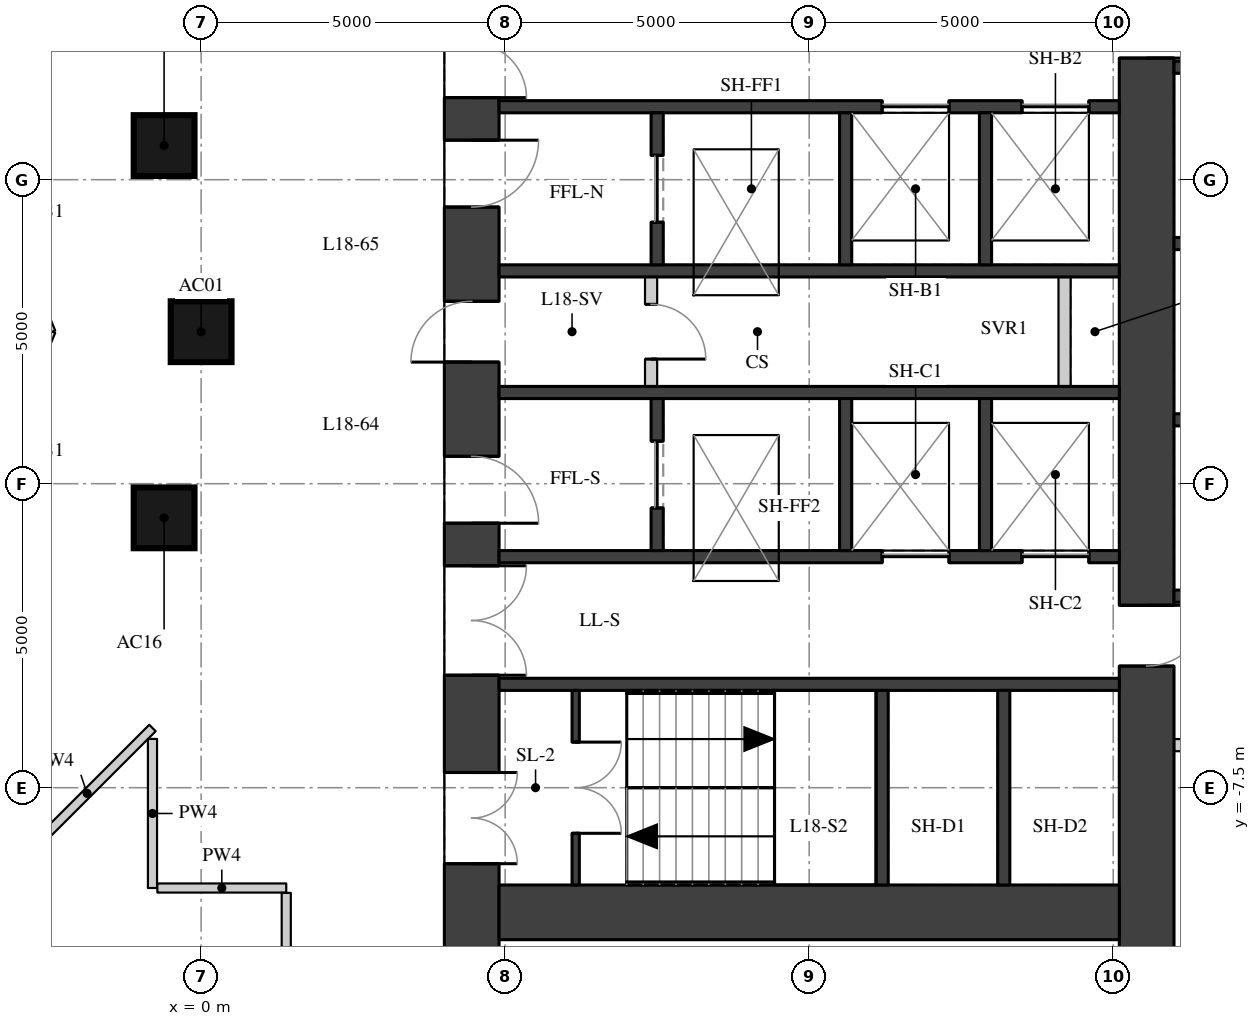
"""IFC4 building model, lengths in metres.
Left out: names, types, materials, properties, quantities, classifications, styles, units other than length and angle.
Written with IfcOpenShell. Run it as: python <this file> out.ifc"""

import sys

from ifc_helpers import new_model, si_unit, direction, frame, frame_2d, origin, origin_2d, place, context, subcontext, project, spatial, rectangle, extrude, element, fill, save


model = new_model("IFC4")
c1 = context("Model", 3, precision=1e-05, world=origin(), true_north=direction((0.0, 1.0)))
c2 = subcontext(c1, "Body", "Model", "MODEL_VIEW")
j1 = project(units=[si_unit("LENGTHUNIT", "METRE"), si_unit("PLANEANGLEUNIT", "RADIAN")], contexts=[c1])
p1 = place(None, origin())
s1 = spatial("IfcSite", under=j1, at=p1, CompositionType="ELEMENT")
p2 = place(p1, origin())
s2 = spatial("IfcBuilding", under=s1, at=p2, CompositionType="ELEMENT")
p3 = place(p2, frame((0.0, 0.0, 67.9)))
s3 = spatial("IfcBuildingStorey", under=s2, at=p3, CompositionType="ELEMENT", Elevation=67.9)
for number, where, z_axis, x_axis in (
    (1, (0.0, 0.0, 0.0), (0.0, 0.0, 1.0), (1.0, 0.0, 0.0)),
    (2, (-0.609, 3.062, 0.0), (0.0, 0.0, 1.0), (1.0, 0.0, 0.0)),
    (3, (-0.609, -3.062, 0.0), (0.0, 0.0, 1.0), (1.0, 0.0, 0.0)),
):
    element("IfcColumn", number, at=place(p3, frame(where, z_axis=z_axis, x_axis=x_axis)), inside=s3, PredefinedType="COLUMN", context=c2, shape_type="SweptSolid", body=[
        extrude(rectangle(XDim=1.0, YDim=1.0, at=origin_2d()), origin(), (0.0, 0.0, 1.0), 3.3),
    ])
p4 = place(p3, frame((4.45, -11.1, 0.0), z_axis=(0.0, 0.0, 1.0), x_axis=(0.0, 1.0, 0.0)))
e4 = element("IfcWall", 4, at=p4, inside=s3, PredefinedType="SHEAR", context=c2, shape_type="SweptSolid", body=[
    extrude(rectangle(XDim=22.2, YDim=0.9, at=frame_2d((11.1, 0.0))), origin(), (0.0, 0.0, 1.0), 3.02),
])
p5 = place(p4, frame((2.35, 0.0, 0.0)))
e5 = element("IfcOpeningElement", 5, at=p5, cuts=e4, PredefinedType="OPENING", context=c2, shape_type="SweptSolid", body=[
    extrude(rectangle(XDim=1.5, YDim=2.1, at=frame_2d((0.75, 1.05))), frame((0.0, 0.46, 0.0), z_axis=(0.0, -1.0, 0.0), x_axis=(1.0, 0.0, 0.0)), (0.0, 0.0, 1.0), 0.92),
])
p6 = place(p4, frame((5.45, 0.0, 0.0)))
e6 = element("IfcOpeningElement", 6, at=p6, cuts=e4, PredefinedType="OPENING", context=c2, shape_type="SweptSolid", body=[
    extrude(rectangle(XDim=1.8, YDim=2.1, at=frame_2d((0.9, 1.05))), frame((0.0, 0.46, 0.0), z_axis=(0.0, -1.0, 0.0), x_axis=(1.0, 0.0, 0.0)), (0.0, 0.0, 1.0), 0.92),
])
p7 = place(p4, frame((7.95, 0.0, 0.0)))
e7 = element("IfcOpeningElement", 7, at=p7, cuts=e4, PredefinedType="OPENING", context=c2, shape_type="SweptSolid", body=[
    extrude(rectangle(XDim=1.1, YDim=2.1, at=frame_2d((0.55, 1.05))), frame((0.0, 0.46, 0.0), z_axis=(0.0, -1.0, 0.0), x_axis=(1.0, 0.0, 0.0)), (0.0, 0.0, 1.0), 0.92),
])
p8 = place(p4, frame((10.6, 0.0, 0.0)))
e8 = element("IfcOpeningElement", 8, at=p8, cuts=e4, PredefinedType="OPENING", context=c2, shape_type="SweptSolid", body=[
    extrude(rectangle(XDim=1.0, YDim=2.1, at=frame_2d((0.5, 1.05))), frame((0.0, 0.46, 0.0), z_axis=(0.0, -1.0, 0.0), x_axis=(1.0, 0.0, 0.0)), (0.0, 0.0, 1.0), 0.92),
])
p9 = place(p4, frame((13.15, 0.0, 0.0)))
e9 = element("IfcOpeningElement", 9, at=p9, cuts=e4, PredefinedType="OPENING", context=c2, shape_type="SweptSolid", body=[
    extrude(rectangle(XDim=1.1, YDim=2.1, at=frame_2d((0.55, 1.05))), frame((0.0, 0.46, 0.0), z_axis=(0.0, -1.0, 0.0), x_axis=(1.0, 0.0, 0.0)), (0.0, 0.0, 1.0), 0.92),
])
p10 = place(p4, frame((14.95, 0.0, 0.0)))
e10 = element("IfcOpeningElement", 10, at=p10, cuts=e4, PredefinedType="OPENING", context=c2, shape_type="SweptSolid", body=[
    extrude(rectangle(XDim=1.8, YDim=2.1, at=frame_2d((0.9, 1.05))), frame((0.0, 0.46, 0.0), z_axis=(0.0, -1.0, 0.0), x_axis=(1.0, 0.0, 0.0)), (0.0, 0.0, 1.0), 0.92),
])
p11 = place(p4, frame((18.35, 0.0, 0.0)))
e11 = element("IfcOpeningElement", 11, at=p11, cuts=e4, PredefinedType="OPENING", context=c2, shape_type="SweptSolid", body=[
    extrude(rectangle(XDim=1.5, YDim=2.1, at=frame_2d((0.75, 1.05))), frame((0.0, 0.46, 0.0), z_axis=(0.0, -1.0, 0.0), x_axis=(1.0, 0.0, 0.0)), (0.0, 0.0, 1.0), 0.92),
])
p12 = place(p3, frame((15.55, -11.1, 0.0), z_axis=(0.0, 0.0, 1.0), x_axis=(0.0, 1.0, 0.0)))
e12 = element("IfcWall", 12, at=p12, inside=s3, PredefinedType="SHEAR", context=c2, shape_type="SweptSolid", body=[
    extrude(rectangle(XDim=22.2, YDim=0.9, at=frame_2d((11.1, 0.0))), origin(), (0.0, 0.0, 1.0), 3.02),
])
p13 = place(p12, frame((15.6, 0.0, 0.0)))
e13 = element("IfcOpeningElement", 13, at=p13, cuts=e12, PredefinedType="OPENING", context=c2, shape_type="SweptSolid", body=[
    extrude(rectangle(XDim=1.0, YDim=2.1, at=frame_2d((0.5, 1.05))), frame((0.0, 0.46, 0.0), z_axis=(0.0, -1.0, 0.0), x_axis=(1.0, 0.0, 0.0)), (0.0, 0.0, 1.0), 0.92),
])
p14 = place(p12, frame((5.6, 0.0, 0.0)))
e14 = element("IfcOpeningElement", 14, at=p14, cuts=e12, PredefinedType="OPENING", context=c2, shape_type="SweptSolid", body=[
    extrude(rectangle(XDim=1.0, YDim=2.1, at=frame_2d((0.5, 1.05))), frame((0.0, 0.46, 0.0), z_axis=(0.0, -1.0, 0.0), x_axis=(1.0, 0.0, 0.0)), (0.0, 0.0, 1.0), 0.92),
])
p15 = place(p3, frame((4.9, -9.55, 0.0), z_axis=(0.0, 0.0, 1.0), x_axis=(1.0, 0.0, 0.0)))
e15 = element("IfcWall", 15, at=p15, inside=s3, PredefinedType="SHEAR", context=c2, shape_type="SweptSolid", body=[
    extrude(rectangle(XDim=10.2, YDim=0.9, at=frame_2d((5.1, 0.0))), origin(), (0.0, 0.0, 1.0), 3.02),
])
p16 = place(p3, frame((4.9, 3.7, 0.0), z_axis=(0.0, 0.0, 1.0), x_axis=(1.0, 0.0, 0.0)))
e16 = element("IfcWall", 16, at=p16, inside=s3, PredefinedType="SHEAR", context=c2, shape_type="SweptSolid", body=[
    extrude(rectangle(XDim=10.2, YDim=0.2, at=frame_2d((5.1, 0.0))), origin(), (0.0, 0.0, 1.0), 3.02),
])
p17 = place(p16, frame((6.3, 0.0, 0.0)))
e17 = element("IfcOpeningElement", 17, at=p17, cuts=e16, PredefinedType="OPENING", context=c2, shape_type="SweptSolid", body=[
    extrude(rectangle(XDim=1.1, YDim=2.1, at=frame_2d((0.55, 1.05))), frame((0.0, 0.11, 0.0), z_axis=(0.0, -1.0, 0.0), x_axis=(1.0, 0.0, 0.0)), (0.0, 0.0, 1.0), 0.22),
])
p18 = place(p16, frame((8.6, 0.0, 0.0)))
e18 = element("IfcOpeningElement", 18, at=p18, cuts=e16, PredefinedType="OPENING", context=c2, shape_type="SweptSolid", body=[
    extrude(rectangle(XDim=1.1, YDim=2.1, at=frame_2d((0.55, 1.05))), frame((0.0, 0.11, 0.0), z_axis=(0.0, -1.0, 0.0), x_axis=(1.0, 0.0, 0.0)), (0.0, 0.0, 1.0), 0.22),
])
for number, where, z_axis, x_axis in (
    (19, (4.9, 1.0, 0.0), (0.0, 0.0, 1.0), (1.0, 0.0, 0.0)),
    (20, (4.9, -1.0, 0.0), (0.0, 0.0, 1.0), (1.0, 0.0, 0.0)),
):
    element("IfcWall", number, at=place(p3, frame(where, z_axis=z_axis, x_axis=x_axis)), inside=s3, PredefinedType="SHEAR", context=c2, shape_type="SweptSolid", body=[
        extrude(rectangle(XDim=10.2, YDim=0.2, at=frame_2d((5.1, 0.0))), origin(), (0.0, 0.0, 1.0), 3.02),
    ])
p19 = place(p3, frame((4.9, -3.7, 0.0), z_axis=(0.0, 0.0, 1.0), x_axis=(1.0, 0.0, 0.0)))
e21 = element("IfcWall", 21, at=p19, inside=s3, PredefinedType="SHEAR", context=c2, shape_type="SweptSolid", body=[
    extrude(rectangle(XDim=10.2, YDim=0.2, at=frame_2d((5.1, 0.0))), origin(), (0.0, 0.0, 1.0), 3.02),
])
p20 = place(p19, frame((6.3, 0.0, 0.0)))
e22 = element("IfcOpeningElement", 22, at=p20, cuts=e21, PredefinedType="OPENING", context=c2, shape_type="SweptSolid", body=[
    extrude(rectangle(XDim=1.1, YDim=2.1, at=frame_2d((0.55, 1.05))), frame((0.0, 0.11, 0.0), z_axis=(0.0, -1.0, 0.0), x_axis=(1.0, 0.0, 0.0)), (0.0, 0.0, 1.0), 0.22),
])
p21 = place(p19, frame((8.6, 0.0, 0.0)))
e23 = element("IfcOpeningElement", 23, at=p21, cuts=e21, PredefinedType="OPENING", context=c2, shape_type="SweptSolid", body=[
    extrude(rectangle(XDim=1.1, YDim=2.1, at=frame_2d((0.55, 1.05))), frame((0.0, 0.11, 0.0), z_axis=(0.0, -1.0, 0.0), x_axis=(1.0, 0.0, 0.0)), (0.0, 0.0, 1.0), 0.22),
])
p22 = place(p3, frame((4.9, -5.8, 0.0), z_axis=(0.0, 0.0, 1.0), x_axis=(1.0, 0.0, 0.0)))
e24 = element("IfcWall", 24, at=p22, inside=s3, PredefinedType="SHEAR", context=c2, shape_type="SweptSolid", body=[
    extrude(rectangle(XDim=10.2, YDim=0.2, at=frame_2d((5.1, 0.0))), origin(), (0.0, 0.0, 1.0), 3.02),
])
for number, where, z_axis, x_axis in (
    (25, (11.2, -9.1, 0.0), (0.0, 0.0, 1.0), (0.0, 1.0, 0.0)),
    (26, (13.2, -9.1, 0.0), (0.0, 0.0, 1.0), (0.0, 1.0, 0.0)),
):
    element("IfcWall", number, at=place(p3, frame(where, z_axis=z_axis, x_axis=x_axis)), inside=s3, PredefinedType="SHEAR", context=c2, shape_type="SweptSolid", body=[
        extrude(rectangle(XDim=3.2, YDim=0.2, at=frame_2d((1.6, 0.0))), origin(), (0.0, 0.0, 1.0), 3.02),
    ])
p23 = place(p3, frame((7.5, 1.1, 0.0), z_axis=(0.0, 0.0, 1.0), x_axis=(0.0, 1.0, 0.0)))
e27 = element("IfcWall", 27, at=p23, inside=s3, PredefinedType="SHEAR", context=c2, shape_type="SweptSolid", body=[
    extrude(rectangle(XDim=2.5, YDim=0.2, at=frame_2d((1.25, 0.0))), origin(), (0.0, 0.0, 1.0), 3.02),
])
p24 = place(p23, frame((0.7, 0.0, 0.0)))
e28 = element("IfcOpeningElement", 28, at=p24, cuts=e27, PredefinedType="OPENING", context=c2, shape_type="SweptSolid", body=[
    extrude(rectangle(XDim=1.1, YDim=2.1, at=frame_2d((0.55, 1.05))), frame((0.0, 0.11, 0.0), z_axis=(0.0, -1.0, 0.0), x_axis=(1.0, 0.0, 0.0)), (0.0, 0.0, 1.0), 0.22),
])
p25 = place(p3, frame((7.5, -3.6, 0.0), z_axis=(0.0, 0.0, 1.0), x_axis=(0.0, 1.0, 0.0)))
e29 = element("IfcWall", 29, at=p25, inside=s3, PredefinedType="SHEAR", context=c2, shape_type="SweptSolid", body=[
    extrude(rectangle(XDim=2.5, YDim=0.2, at=frame_2d((1.25, 0.0))), origin(), (0.0, 0.0, 1.0), 3.02),
])
p26 = place(p25, frame((0.7, 0.0, 0.0)))
e30 = element("IfcOpeningElement", 30, at=p26, cuts=e29, PredefinedType="OPENING", context=c2, shape_type="SweptSolid", body=[
    extrude(rectangle(XDim=1.1, YDim=2.1, at=frame_2d((0.55, 1.05))), frame((0.0, 0.11, 0.0), z_axis=(0.0, -1.0, 0.0), x_axis=(1.0, 0.0, 0.0)), (0.0, 0.0, 1.0), 0.22),
])
for number, where, z_axis, x_axis in (
    (31, (10.6, 1.1, 0.0), (0.0, 0.0, 1.0), (0.0, 1.0, 0.0)),
    (32, (10.6, -3.6, 0.0), (0.0, 0.0, 1.0), (0.0, 1.0, 0.0)),
    (33, (12.9, 1.1, 0.0), (0.0, 0.0, 1.0), (0.0, 1.0, 0.0)),
    (34, (12.9, -3.6, 0.0), (0.0, 0.0, 1.0), (0.0, 1.0, 0.0)),
):
    element("IfcWall", number, at=place(p3, frame(where, z_axis=z_axis, x_axis=x_axis)), inside=s3, PredefinedType="SHEAR", context=c2, shape_type="SweptSolid", body=[
        extrude(rectangle(XDim=2.5, YDim=0.2, at=frame_2d((1.25, 0.0))), origin(), (0.0, 0.0, 1.0), 3.02),
    ])
p27 = place(p3, frame((6.16, -9.1, 0.0), z_axis=(0.0, 0.0, 1.0), x_axis=(0.0, 1.0, 0.0)))
e35 = element("IfcWall", 35, at=p27, inside=s3, PredefinedType="SHEAR", context=c2, shape_type="SweptSolid", body=[
    extrude(rectangle(XDim=3.2, YDim=0.12, at=frame_2d((1.6, 0.0))), origin(), (0.0, 0.0, 1.0), 3.02),
])
p28 = place(p27, frame((0.85, 0.0, 0.0)))
e36 = element("IfcOpeningElement", 36, at=p28, cuts=e35, PredefinedType="OPENING", context=c2, shape_type="SweptSolid", body=[
    extrude(rectangle(XDim=1.5, YDim=2.1, at=frame_2d((0.75, 1.05))), frame((0.0, 0.07, 0.0), z_axis=(0.0, -1.0, 0.0), x_axis=(1.0, 0.0, 0.0)), (0.0, 0.0, 1.0), 0.14),
])
p29 = place(p3, frame((7.4, -0.9, 0.0), z_axis=(0.0, 0.0, 1.0), x_axis=(0.0, 1.0, 0.0)))
e37 = element("IfcWall", 37, at=p29, inside=s3, PredefinedType="PARTITIONING", context=c2, shape_type="SweptSolid", body=[
    extrude(rectangle(XDim=1.8, YDim=0.2, at=frame_2d((0.9, 0.0))), origin(), (0.0, 0.0, 1.0), 3.02),
])
p30 = place(p29, frame((0.45, 0.0, 0.0)))
e38 = element("IfcOpeningElement", 38, at=p30, cuts=e37, PredefinedType="OPENING", context=c2, shape_type="SweptSolid", body=[
    extrude(rectangle(XDim=0.9, YDim=2.1, at=frame_2d((0.45, 1.05))), frame((0.0, 0.11, 0.0), z_axis=(0.0, -1.0, 0.0), x_axis=(1.0, 0.0, 0.0)), (0.0, 0.0, 1.0), 0.22),
])
p31 = place(p3, frame((14.2, -0.9, 0.0), z_axis=(0.0, 0.0, 1.0), x_axis=(0.0, 1.0, 0.0)))
e39 = element("IfcWall", 39, at=p31, inside=s3, PredefinedType="PARTITIONING", context=c2, shape_type="SweptSolid", body=[
    extrude(rectangle(XDim=1.8, YDim=0.2, at=frame_2d((0.9, 0.0))), origin(), (0.0, 0.0, 1.0), 3.02),
])
for number, where, z_axis, x_axis in (
    (40, (16.0, -4.35, 0.0), (0.0, 0.0, 1.0), (1.0, 0.0, 0.0)),
    (41, (16.0, -1.45, 0.0), (0.0, 0.0, 1.0), (1.0, 0.0, 0.0)),
    (42, (16.0, 1.45, 0.0), (0.0, 0.0, 1.0), (1.0, 0.0, 0.0)),
    (43, (16.0, 4.35, 0.0), (0.0, 0.0, 1.0), (1.0, 0.0, 0.0)),
):
    element("IfcWall", number, at=place(p3, frame(where, z_axis=z_axis, x_axis=x_axis)), inside=s3, PredefinedType="SHEAR", context=c2, shape_type="SweptSolid", body=[
        extrude(rectangle(XDim=2.3, YDim=0.2, at=frame_2d((1.15, 0.0))), origin(), (0.0, 0.0, 1.0), 3.02),
    ])
p32 = place(p3, frame((16.0, -6.8, 0.0), z_axis=(0.0, 0.0, 1.0), x_axis=(1.0, 0.0, 0.0)))
e44 = element("IfcWall", 44, at=p32, inside=s3, PredefinedType="PARTITIONING", context=c2, shape_type="SweptSolid", body=[
    extrude(rectangle(XDim=2.3, YDim=0.2, at=frame_2d((1.15, 0.0))), origin(), (0.0, 0.0, 1.0), 3.02),
])
p33 = place(p32, frame((0.2, 0.0, 0.0)))
e45 = element("IfcOpeningElement", 45, at=p33, cuts=e44, PredefinedType="OPENING", context=c2, shape_type="SweptSolid", body=[
    extrude(rectangle(XDim=0.9, YDim=2.1, at=frame_2d((0.45, 1.05))), frame((0.0, 0.11, 0.0), z_axis=(0.0, -1.0, 0.0), x_axis=(1.0, 0.0, 0.0)), (0.0, 0.0, 1.0), 0.22),
])
p34 = place(p3, frame((-2.951, -8.668, 0.0), z_axis=(0.0, 0.0, 1.0), x_axis=(0.707106781187, 0.707106781187, 0.0)))
e46 = element("IfcWall", 46, at=p34, inside=s3, PredefinedType="PARTITIONING", context=c2, shape_type="SweptSolid", body=[
    extrude(rectangle(XDim=3.042, YDim=0.15, at=frame_2d((1.521, 0.0))), origin(), (0.0, 0.0, 1.0), 3.02),
])
p35 = place(p3, frame((-0.8, -6.698, 0.0), z_axis=(0.0, 0.0, 1.0), x_axis=(0.0, -1.0, 0.0)))
e47 = element("IfcWall", 47, at=p35, inside=s3, PredefinedType="PARTITIONING", context=c2, shape_type="SweptSolid", body=[
    extrude(rectangle(XDim=2.452, YDim=0.15, at=frame_2d((1.226, 0.0))), origin(), (0.0, 0.0, 1.0), 3.02),
])
p36 = place(p3, frame((-0.72, -9.15, 0.0), z_axis=(0.0, 0.0, 1.0), x_axis=(1.0, 0.0, 0.0)))
e48 = element("IfcWall", 48, at=p36, inside=s3, PredefinedType="PARTITIONING", context=c2, shape_type="SweptSolid", body=[
    extrude(rectangle(XDim=2.12, YDim=0.15, at=frame_2d((1.06, 0.0))), origin(), (0.0, 0.0, 1.0), 3.02),
])
p37 = place(p3, frame((1.4, -9.23, 0.0), z_axis=(0.0, 0.0, 1.0), x_axis=(0.0, -1.0, 0.0)))
e49 = element("IfcWall", 49, at=p37, inside=s3, PredefinedType="PARTITIONING", context=c2, shape_type="SweptSolid", body=[
    extrude(rectangle(XDim=6.877, YDim=0.15, at=frame_2d((3.438, 0.0))), origin(), (0.0, 0.0, 1.0), 3.02),
])
for number, where, z_axis, x_axis in (
    (50, (-2.446, 0.0, 0.0), (0.0, 0.0, 1.0), (-0.383, -0.924, 0.0)),
    (51, (-4.073, 3.927, 0.0), (0.0, 0.0, 1.0), (0.383, -0.924, 0.0)),
):
    element("IfcWall", number, at=place(p3, frame(where, z_axis=z_axis, x_axis=x_axis)), inside=s3, PredefinedType="PARTITIONING", context=c2, shape_type="SweptSolid", body=[
        extrude(rectangle(XDim=4.251, YDim=0.1, at=frame_2d((2.125, 0.0))), origin(), (0.0, 0.0, 1.0), 3.02),
    ])
p38 = place(p5, origin())
e52 = element("IfcDoor", 52, at=p38, inside=s3, OperationType="DOUBLE_DOOR_SINGLE_SWING", PredefinedType="DOOR", context=c2, shape_type="SweptSolid", body=[
    extrude(rectangle(XDim=1.5, YDim=2.1, at=frame_2d((0.75, 1.05))), frame((0.0, 0.025, 0.0), z_axis=(0.0, -1.0, 0.0), x_axis=(1.0, 0.0, 0.0)), (0.0, 0.0, 1.0), 0.05),
])
fill(e5, e52)
p39 = place(p6, origin())
e53 = element("IfcDoor", 53, at=p39, inside=s3, OperationType="DOUBLE_DOOR_SINGLE_SWING", PredefinedType="DOOR", context=c2, shape_type="SweptSolid", body=[
    extrude(rectangle(XDim=1.8, YDim=2.1, at=frame_2d((0.9, 1.05))), frame((0.0, 0.025, 0.0), z_axis=(0.0, -1.0, 0.0), x_axis=(1.0, 0.0, 0.0)), (0.0, 0.0, 1.0), 0.05),
])
fill(e6, e53)
p40 = place(p7, origin())
e54 = element("IfcDoor", 54, at=p40, inside=s3, OperationType="SINGLE_SWING_RIGHT", PredefinedType="DOOR", context=c2, shape_type="SweptSolid", body=[
    extrude(rectangle(XDim=1.1, YDim=2.1, at=frame_2d((0.55, 1.05))), frame((0.0, 0.025, 0.0), z_axis=(0.0, -1.0, 0.0), x_axis=(1.0, 0.0, 0.0)), (0.0, 0.0, 1.0), 0.05),
])
fill(e7, e54)
p41 = place(p8, origin())
e55 = element("IfcDoor", 55, at=p41, inside=s3, OperationType="SINGLE_SWING_LEFT", PredefinedType="DOOR", context=c2, shape_type="SweptSolid", body=[
    extrude(rectangle(XDim=1.0, YDim=2.1, at=frame_2d((0.5, 1.05))), frame((0.0, 0.025, 0.0), z_axis=(0.0, -1.0, 0.0), x_axis=(1.0, 0.0, 0.0)), (0.0, 0.0, 1.0), 0.05),
])
fill(e8, e55)
p42 = place(p9, origin())
e56 = element("IfcDoor", 56, at=p42, inside=s3, OperationType="SINGLE_SWING_LEFT", PredefinedType="DOOR", context=c2, shape_type="SweptSolid", body=[
    extrude(rectangle(XDim=1.1, YDim=2.1, at=frame_2d((0.55, 1.05))), frame((0.0, 0.025, 0.0), z_axis=(0.0, -1.0, 0.0), x_axis=(1.0, 0.0, 0.0)), (0.0, 0.0, 1.0), 0.05),
])
fill(e9, e56)
p43 = place(p10, origin())
e57 = element("IfcDoor", 57, at=p43, inside=s3, OperationType="DOUBLE_DOOR_SINGLE_SWING", PredefinedType="DOOR", context=c2, shape_type="SweptSolid", body=[
    extrude(rectangle(XDim=1.8, YDim=2.1, at=frame_2d((0.9, 1.05))), frame((0.0, 0.025, 0.0), z_axis=(0.0, -1.0, 0.0), x_axis=(1.0, 0.0, 0.0)), (0.0, 0.0, 1.0), 0.05),
])
fill(e10, e57)
p44 = place(p28, origin())
e58 = element("IfcDoor", 58, at=p44, inside=s3, OperationType="DOUBLE_DOOR_SINGLE_SWING", PredefinedType="DOOR", context=c2, shape_type="SweptSolid", body=[
    extrude(rectangle(XDim=1.5, YDim=2.1, at=frame_2d((0.75, 1.05))), frame((0.0, 0.025, 0.0), z_axis=(0.0, -1.0, 0.0), x_axis=(1.0, 0.0, 0.0)), (0.0, 0.0, 1.0), 0.05),
])
fill(e36, e58)
p45 = place(p17, origin())
e59 = element("IfcDoor", 59, at=p45, inside=s3, OperationType="DOUBLE_DOOR_SLIDING", PredefinedType="DOOR", context=c2, shape_type="SweptSolid", body=[
    extrude(rectangle(XDim=1.1, YDim=2.1, at=frame_2d((0.55, 1.05))), frame((0.0, 0.025, 0.0), z_axis=(0.0, -1.0, 0.0), x_axis=(1.0, 0.0, 0.0)), (0.0, 0.0, 1.0), 0.05),
])
fill(e17, e59)
p46 = place(p18, origin())
e60 = element("IfcDoor", 60, at=p46, inside=s3, OperationType="DOUBLE_DOOR_SLIDING", PredefinedType="DOOR", context=c2, shape_type="SweptSolid", body=[
    extrude(rectangle(XDim=1.1, YDim=2.1, at=frame_2d((0.55, 1.05))), frame((0.0, 0.025, 0.0), z_axis=(0.0, -1.0, 0.0), x_axis=(1.0, 0.0, 0.0)), (0.0, 0.0, 1.0), 0.05),
])
fill(e18, e60)
p47 = place(p20, origin())
e61 = element("IfcDoor", 61, at=p47, inside=s3, OperationType="DOUBLE_DOOR_SLIDING", PredefinedType="DOOR", context=c2, shape_type="SweptSolid", body=[
    extrude(rectangle(XDim=1.1, YDim=2.1, at=frame_2d((0.55, 1.05))), frame((0.0, 0.025, 0.0), z_axis=(0.0, -1.0, 0.0), x_axis=(1.0, 0.0, 0.0)), (0.0, 0.0, 1.0), 0.05),
])
fill(e22, e61)
p48 = place(p21, origin())
e62 = element("IfcDoor", 62, at=p48, inside=s3, OperationType="DOUBLE_DOOR_SLIDING", PredefinedType="DOOR", context=c2, shape_type="SweptSolid", body=[
    extrude(rectangle(XDim=1.1, YDim=2.1, at=frame_2d((0.55, 1.05))), frame((0.0, 0.025, 0.0), z_axis=(0.0, -1.0, 0.0), x_axis=(1.0, 0.0, 0.0)), (0.0, 0.0, 1.0), 0.05),
])
fill(e23, e62)
p49 = place(p24, origin())
e63 = element("IfcDoor", 63, at=p49, inside=s3, OperationType="DOUBLE_DOOR_SLIDING", PredefinedType="DOOR", context=c2, shape_type="SweptSolid", body=[
    extrude(rectangle(XDim=1.1, YDim=2.1, at=frame_2d((0.55, 1.05))), frame((0.0, 0.025, 0.0), z_axis=(0.0, -1.0, 0.0), x_axis=(1.0, 0.0, 0.0)), (0.0, 0.0, 1.0), 0.05),
])
fill(e28, e63)
p50 = place(p26, origin())
e64 = element("IfcDoor", 64, at=p50, inside=s3, OperationType="DOUBLE_DOOR_SLIDING", PredefinedType="DOOR", context=c2, shape_type="SweptSolid", body=[
    extrude(rectangle(XDim=1.1, YDim=2.1, at=frame_2d((0.55, 1.05))), frame((0.0, 0.025, 0.0), z_axis=(0.0, -1.0, 0.0), x_axis=(1.0, 0.0, 0.0)), (0.0, 0.0, 1.0), 0.05),
])
fill(e30, e64)
p51 = place(p30, origin())
e65 = element("IfcDoor", 65, at=p51, inside=s3, OperationType="SINGLE_SWING_RIGHT", PredefinedType="DOOR", context=c2, shape_type="SweptSolid", body=[
    extrude(rectangle(XDim=0.9, YDim=2.1, at=frame_2d((0.45, 1.05))), frame((0.0, 0.025, 0.0), z_axis=(0.0, -1.0, 0.0), x_axis=(1.0, 0.0, 0.0)), (0.0, 0.0, 1.0), 0.05),
])
fill(e38, e65)
p52 = place(p13, origin())
e66 = element("IfcDoor", 66, at=p52, inside=s3, OperationType="SINGLE_SWING_RIGHT", PredefinedType="DOOR", context=c2, shape_type="SweptSolid", body=[
    extrude(rectangle(XDim=1.0, YDim=2.1, at=frame_2d((0.5, 1.05))), frame((0.0, 0.025, 0.0), z_axis=(0.0, -1.0, 0.0), x_axis=(1.0, 0.0, 0.0)), (0.0, 0.0, 1.0), 0.05),
])
fill(e13, e66)
p53 = place(p14, origin())
e67 = element("IfcDoor", 67, at=p53, inside=s3, OperationType="SINGLE_SWING_LEFT", PredefinedType="DOOR", context=c2, shape_type="SweptSolid", body=[
    extrude(rectangle(XDim=1.0, YDim=2.1, at=frame_2d((0.5, 1.05))), frame((0.0, 0.025, 0.0), z_axis=(0.0, -1.0, 0.0), x_axis=(1.0, 0.0, 0.0)), (0.0, 0.0, 1.0), 0.05),
])
fill(e14, e67)
save(model, sys.argv[1])
